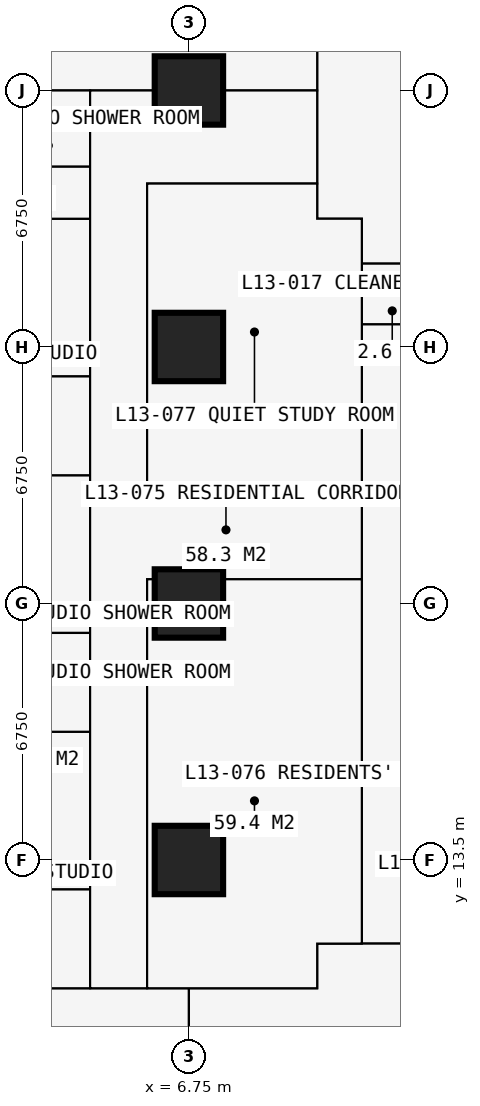
"""IFC4 building model, lengths in metres.
Left out: names, types, materials, properties, quantities, classifications, styles, units other than length and angle.
Written with IfcOpenShell. Run it as: python <this file> out.ifc"""

import sys

from ifc_helpers import new_model, si_unit, direction, frame, frame_2d, origin, origin_2d, place, context, subcontext, project, spatial, rectangle, extrude, element, fill, save


model = new_model("IFC4")
c1 = context("Model", 3, precision=1e-05, world=origin(), true_north=direction((0.0, 1.0)))
c2 = subcontext(c1, "Body", "Model", "MODEL_VIEW")
j1 = project(units=[si_unit("LENGTHUNIT", "METRE"), si_unit("PLANEANGLEUNIT", "RADIAN")], contexts=[c1])
p1 = place(None, origin())
s1 = spatial("IfcSite", under=j1, at=p1, CompositionType="ELEMENT")
p2 = place(p1, origin())
s2 = spatial("IfcBuilding", under=s1, at=p2, CompositionType="ELEMENT")
p3 = place(p2, frame((0.0, 0.0, 50.4)))
s3 = spatial("IfcBuildingStorey", under=s2, at=p3, CompositionType="ELEMENT", Elevation=50.4)
for number, where, z_axis, x_axis in (
    (1, (6.75, 13.5, 0.0), (0.0, 0.0, 1.0), (1.0, 0.0, 0.0)),
    (2, (6.75, 20.25, 0.0), (0.0, 0.0, 1.0), (1.0, 0.0, 0.0)),
    (3, (6.75, 27.0, 0.0), (0.0, 0.0, 1.0), (1.0, 0.0, 0.0)),
    (4, (6.75, 33.75, 0.0), (0.0, 0.0, 1.0), (1.0, 0.0, 0.0)),
):
    element("IfcColumn", number, at=place(p3, frame(where, z_axis=z_axis, x_axis=x_axis)), inside=s3, PredefinedType="COLUMN", context=c2, shape_type="SweptSolid", body=[
        extrude(rectangle(XDim=1.8, YDim=1.8, at=origin_2d()), origin(), (0.0, 0.0, 1.0), 3.6),
    ])
p4 = place(p3, frame((-0.734, 10.125, 0.0), z_axis=(0.0, 0.0, 1.0), x_axis=(1.0, 0.0, 0.0)))
e5 = element("IfcWall", 5, at=p4, inside=s3, PredefinedType="PARTITIONING", context=c2, shape_type="SweptSolid", body=[
    extrude(rectangle(XDim=10.859, YDim=0.15, at=frame_2d((5.429, 0.0))), origin(), (0.0, 0.0, 1.0), 3.375),
])
p5 = place(p4, frame((5.134, 0.0, 0.0)))
e6 = element("IfcOpeningElement", 6, at=p5, cuts=e5, PredefinedType="OPENING", context=c2, shape_type="SweptSolid", body=[
    extrude(rectangle(XDim=1.0, YDim=2.2, at=frame_2d((0.5, 1.1))), frame((0.0, 0.085, 0.0), z_axis=(0.0, -1.0, 0.0), x_axis=(1.0, 0.0, 0.0)), (0.0, 0.0, 1.0), 0.17),
])
p6 = place(p3, frame((-0.734, 16.875, 0.0), z_axis=(0.0, 0.0, 1.0), x_axis=(1.0, 0.0, 0.0)))
e7 = element("IfcWall", 7, at=p6, inside=s3, PredefinedType="PARTITIONING", context=c2, shape_type="SweptSolid", body=[
    extrude(rectangle(XDim=4.884, YDim=0.175, at=frame_2d((2.442, 0.0))), origin(), (0.0, 0.0, 1.0), 3.375),
])
p7 = place(p6, frame((3.234, 0.0, 0.0)))
e8 = element("IfcOpeningElement", 8, at=p7, cuts=e7, PredefinedType="OPENING", context=c2, shape_type="SweptSolid", body=[
    extrude(rectangle(XDim=0.9, YDim=2.2, at=frame_2d((0.45, 1.1))), frame((0.0, 0.097, 0.0), z_axis=(0.0, -1.0, 0.0), x_axis=(1.0, 0.0, 0.0)), (0.0, 0.0, 1.0), 0.195),
])
p8 = place(p3, frame((-0.734, 23.625, 0.0), z_axis=(0.0, 0.0, 1.0), x_axis=(1.0, 0.0, 0.0)))
e9 = element("IfcWall", 9, at=p8, inside=s3, PredefinedType="PARTITIONING", context=c2, shape_type="SweptSolid", body=[
    extrude(rectangle(XDim=4.884, YDim=0.175, at=frame_2d((2.442, 0.0))), origin(), (0.0, 0.0, 1.0), 3.375),
])
p9 = place(p8, frame((3.234, 0.0, 0.0)))
e10 = element("IfcOpeningElement", 10, at=p9, cuts=e9, PredefinedType="OPENING", context=c2, shape_type="SweptSolid", body=[
    extrude(rectangle(XDim=0.9, YDim=2.2, at=frame_2d((0.45, 1.1))), frame((0.0, 0.097, 0.0), z_axis=(0.0, -1.0, 0.0), x_axis=(1.0, 0.0, 0.0)), (0.0, 0.0, 1.0), 0.195),
])
p10 = place(p3, frame((-0.734, 30.375, 0.0), z_axis=(0.0, 0.0, 1.0), x_axis=(1.0, 0.0, 0.0)))
e11 = element("IfcWall", 11, at=p10, inside=s3, PredefinedType="PARTITIONING", context=c2, shape_type="SweptSolid", body=[
    extrude(rectangle(XDim=4.884, YDim=0.175, at=frame_2d((2.442, 0.0))), origin(), (0.0, 0.0, 1.0), 3.375),
])
p11 = place(p3, frame((-0.734, 33.75, 0.0), z_axis=(0.0, 0.0, 1.0), x_axis=(1.0, 0.0, 0.0)))
e12 = element("IfcWall", 12, at=p11, inside=s3, PredefinedType="PARTITIONING", context=c2, shape_type="SweptSolid", body=[
    extrude(rectangle(XDim=10.859, YDim=0.15, at=frame_2d((5.429, 0.0))), origin(), (0.0, 0.0, 1.0), 2.877),
])
for number, where, z_axis, x_axis in (
    (13, (1.75, 12.725, 0.0), (0.0, 0.0, 1.0), (1.0, 0.0, 0.0)),
    (14, (1.75, 19.475, 0.0), (0.0, 0.0, 1.0), (1.0, 0.0, 0.0)),
    (15, (1.75, 26.225, 0.0), (0.0, 0.0, 1.0), (1.0, 0.0, 0.0)),
):
    element("IfcWall", number, at=place(p3, frame(where, z_axis=z_axis, x_axis=x_axis)), inside=s3, PredefinedType="PARTITIONING", context=c2, shape_type="SweptSolid", body=[
        extrude(rectangle(XDim=2.4, YDim=0.1, at=frame_2d((1.2, 0.0))), origin(), (0.0, 0.0, 1.0), 3.375),
    ])
p12 = place(p3, frame((1.95, 31.75, 0.0), z_axis=(0.0, 0.0, 1.0), x_axis=(1.0, 0.0, 0.0)))
e16 = element("IfcWall", 16, at=p12, inside=s3, PredefinedType="PARTITIONING", context=c2, shape_type="SweptSolid", body=[
    extrude(rectangle(XDim=2.2, YDim=0.1, at=frame_2d((1.1, 0.0))), origin(), (0.0, 0.0, 1.0), 3.375),
])
p13 = place(p12, frame((0.65, 0.0, 0.0)))
e17 = element("IfcOpeningElement", 17, at=p13, cuts=e16, PredefinedType="OPENING", context=c2, shape_type="SweptSolid", body=[
    extrude(rectangle(XDim=0.9, YDim=2.2, at=frame_2d((0.45, 1.1))), frame((0.0, 0.06, 0.0), z_axis=(0.0, -1.0, 0.0), x_axis=(1.0, 0.0, 0.0)), (0.0, 0.0, 1.0), 0.12),
])
p14 = place(p3, frame((4.15, 10.125, 0.0), z_axis=(0.0, 0.0, 1.0), x_axis=(0.0, 1.0, 0.0)))
e18 = element("IfcWall", 18, at=p14, inside=s3, PredefinedType="PARTITIONING", context=c2, shape_type="SweptSolid", body=[
    extrude(rectangle(XDim=23.625, YDim=0.15, at=frame_2d((11.812, 0.0))), origin(), (0.0, 0.0, 1.0), 3.375),
])
p15 = place(p14, frame((4.2, 0.0, 0.0)))
e19 = element("IfcOpeningElement", 19, at=p15, cuts=e18, PredefinedType="OPENING", context=c2, shape_type="SweptSolid", body=[
    extrude(rectangle(XDim=0.95, YDim=2.2, at=frame_2d((0.475, 1.1))), frame((0.0, 0.085, 0.0), z_axis=(0.0, -1.0, 0.0), x_axis=(1.0, 0.0, 0.0)), (0.0, 0.0, 1.0), 0.17),
])
p16 = place(p14, frame((10.95, 0.0, 0.0)))
e20 = element("IfcOpeningElement", 20, at=p16, cuts=e18, PredefinedType="OPENING", context=c2, shape_type="SweptSolid", body=[
    extrude(rectangle(XDim=0.95, YDim=2.2, at=frame_2d((0.475, 1.1))), frame((0.0, 0.085, 0.0), z_axis=(0.0, -1.0, 0.0), x_axis=(1.0, 0.0, 0.0)), (0.0, 0.0, 1.0), 0.17),
])
p17 = place(p14, frame((17.7, 0.0, 0.0)))
e21 = element("IfcOpeningElement", 21, at=p17, cuts=e18, PredefinedType="OPENING", context=c2, shape_type="SweptSolid", body=[
    extrude(rectangle(XDim=0.95, YDim=2.2, at=frame_2d((0.475, 1.1))), frame((0.0, 0.085, 0.0), z_axis=(0.0, -1.0, 0.0), x_axis=(1.0, 0.0, 0.0)), (0.0, 0.0, 1.0), 0.17),
])
p18 = place(p14, frame((20.5, 0.0, 0.0)))
e22 = element("IfcOpeningElement", 22, at=p18, cuts=e18, PredefinedType="OPENING", context=c2, shape_type="SweptSolid", body=[
    extrude(rectangle(XDim=0.95, YDim=2.2, at=frame_2d((0.475, 1.1))), frame((0.0, 0.085, 0.0), z_axis=(0.0, -1.0, 0.0), x_axis=(1.0, 0.0, 0.0)), (0.0, 0.0, 1.0), 0.17),
])
p19 = place(p3, frame((5.65, 10.125, 0.0), z_axis=(0.0, 0.0, 1.0), x_axis=(0.0, 1.0, 0.0)))
e23 = element("IfcWall", 23, at=p19, inside=s3, PredefinedType="PARTITIONING", context=c2, shape_type="SweptSolid", body=[
    extrude(rectangle(XDim=10.762, YDim=0.15, at=frame_2d((5.381, 0.0))), origin(), (0.0, 0.0, 1.0), 3.375),
])
p20 = place(p19, frame((4.9, 0.0, 0.0)))
e24 = element("IfcOpeningElement", 24, at=p20, cuts=e23, PredefinedType="OPENING", context=c2, shape_type="SweptSolid", body=[
    extrude(rectangle(XDim=0.95, YDim=2.2, at=frame_2d((0.475, 1.1))), frame((0.0, 0.085, 0.0), z_axis=(0.0, -1.0, 0.0), x_axis=(1.0, 0.0, 0.0)), (0.0, 0.0, 1.0), 0.17),
])
p21 = place(p3, frame((5.65, 20.887, 0.0), z_axis=(0.0, 0.0, 1.0), x_axis=(1.0, 0.0, 0.0)))
e25 = element("IfcWall", 25, at=p21, inside=s3, PredefinedType="PARTITIONING", context=c2, shape_type="SweptSolid", body=[
    extrude(rectangle(XDim=5.65, YDim=0.15, at=frame_2d((2.825, 0.0))), origin(), (0.0, 0.0, 1.0), 3.375),
])
p22 = place(p3, frame((5.65, 22.988, 0.0), z_axis=(0.0, 0.0, 1.0), x_axis=(0.0, 1.0, 0.0)))
e26 = element("IfcWall", 26, at=p22, inside=s3, PredefinedType="PARTITIONING", context=c2, shape_type="SweptSolid", body=[
    extrude(rectangle(XDim=8.312, YDim=0.15, at=frame_2d((4.156, 0.0))), origin(), (0.0, 0.0, 1.0), 3.375),
])
p23 = place(p22, frame((4.95, 0.0, 0.0)))
e27 = element("IfcOpeningElement", 27, at=p23, cuts=e26, PredefinedType="OPENING", context=c2, shape_type="SweptSolid", body=[
    extrude(rectangle(XDim=0.95, YDim=2.2, at=frame_2d((0.475, 1.1))), frame((0.0, 0.085, 0.0), z_axis=(0.0, -1.0, 0.0), x_axis=(1.0, 0.0, 0.0)), (0.0, 0.0, 1.0), 0.17),
])
p24 = place(p3, frame((5.65, 22.988, 0.0), z_axis=(0.0, 0.0, 1.0), x_axis=(1.0, 0.0, 0.0)))
e28 = element("IfcWall", 28, at=p24, inside=s3, PredefinedType="PARTITIONING", context=c2, shape_type="SweptSolid", body=[
    extrude(rectangle(XDim=5.65, YDim=0.15, at=frame_2d((2.825, 0.0))), origin(), (0.0, 0.0, 1.0), 3.375),
])
p25 = place(p3, frame((5.65, 31.3, 0.0), z_axis=(0.0, 0.0, 1.0), x_axis=(1.0, 0.0, 0.0)))
e29 = element("IfcWall", 29, at=p25, inside=s3, PredefinedType="PARTITIONING", context=c2, shape_type="SweptSolid", body=[
    extrude(rectangle(XDim=4.475, YDim=0.15, at=frame_2d((2.238, 0.0))), origin(), (0.0, 0.0, 1.0), 3.375),
])
p26 = place(p3, frame((6.75, -0.734, 0.0), z_axis=(0.0, 0.0, 1.0), x_axis=(0.0, 1.0, 0.0)))
e30 = element("IfcWall", 30, at=p26, inside=s3, PredefinedType="PARTITIONING", context=c2, shape_type="SweptSolid", body=[
    extrude(rectangle(XDim=10.859, YDim=0.15, at=frame_2d((5.429, 0.0))), origin(), (0.0, 0.0, 1.0), 2.877),
])
p27 = place(p3, frame((10.125, 10.125, 0.0), z_axis=(0.0, 0.0, 1.0), x_axis=(0.0, 1.0, 0.0)))
e31 = element("IfcWall", 31, at=p27, inside=s3, PredefinedType="PARTITIONING", context=c2, shape_type="SweptSolid", body=[
    extrude(rectangle(XDim=1.175, YDim=0.15, at=frame_2d((0.587, 0.0))), origin(), (0.0, 0.0, 1.0), 3.375),
])
p28 = place(p3, frame((10.125, 11.3, 0.0), z_axis=(0.0, 0.0, 1.0), x_axis=(1.0, 0.0, 0.0)))
e32 = element("IfcWall", 32, at=p28, inside=s3, PredefinedType="PARTITIONING", context=c2, shape_type="SweptSolid", body=[
    extrude(rectangle(XDim=20.675, YDim=0.15, at=frame_2d((10.337, 0.0))), origin(), (0.0, 0.0, 1.0), 3.375),
])
p29 = place(p28, frame((1.775, 0.0, 0.0)))
e33 = element("IfcOpeningElement", 33, at=p29, cuts=e32, PredefinedType="OPENING", context=c2, shape_type="SweptSolid", body=[
    extrude(rectangle(XDim=1.0, YDim=2.2, at=frame_2d((0.5, 1.1))), frame((0.0, 0.085, 0.0), z_axis=(0.0, -1.0, 0.0), x_axis=(1.0, 0.0, 0.0)), (0.0, 0.0, 1.0), 0.17),
])
p30 = place(p28, frame((11.312, 0.0, 0.0)))
e34 = element("IfcOpeningElement", 34, at=p30, cuts=e32, PredefinedType="OPENING", context=c2, shape_type="SweptSolid", body=[
    extrude(rectangle(XDim=1.0, YDim=2.2, at=frame_2d((0.5, 1.1))), frame((0.0, 0.085, 0.0), z_axis=(0.0, -1.0, 0.0), x_axis=(1.0, 0.0, 0.0)), (0.0, 0.0, 1.0), 0.17),
])
p31 = place(p3, frame((10.125, 30.375, 0.0), z_axis=(0.0, 0.0, 1.0), x_axis=(0.0, 1.0, 0.0)))
e35 = element("IfcWall", 35, at=p31, inside=s3, PredefinedType="PARTITIONING", context=c2, shape_type="SweptSolid", body=[
    extrude(rectangle(XDim=10.859, YDim=0.15, at=frame_2d((5.429, 0.0))), origin(), (0.0, 0.0, 1.0), 3.375),
])
p32 = place(p31, frame((4.725, 0.0, 0.0)))
e36 = element("IfcOpeningElement", 36, at=p32, cuts=e35, PredefinedType="OPENING", context=c2, shape_type="SweptSolid", body=[
    extrude(rectangle(XDim=1.0, YDim=2.2, at=frame_2d((0.5, 1.1))), frame((0.0, 0.085, 0.0), z_axis=(0.0, -1.0, 0.0), x_axis=(1.0, 0.0, 0.0)), (0.0, 0.0, 1.0), 0.17),
])
p33 = place(p3, frame((10.125, 30.375, 0.0), z_axis=(0.0, 0.0, 1.0), x_axis=(1.0, 0.0, 0.0)))
e37 = element("IfcWall", 37, at=p33, inside=s3, PredefinedType="PARTITIONING", context=c2, shape_type="SweptSolid", body=[
    extrude(rectangle(XDim=1.175, YDim=0.15, at=frame_2d((0.587, 0.0))), origin(), (0.0, 0.0, 1.0), 3.375),
])
p34 = place(p3, frame((11.3, 11.3, 0.0), z_axis=(0.0, 0.0, 1.0), x_axis=(0.0, 1.0, 0.0)))
e38 = element("IfcWall", 38, at=p34, inside=s3, PredefinedType="PARTITIONING", context=c2, shape_type="SweptSolid", body=[
    extrude(rectangle(XDim=19.075, YDim=0.15, at=frame_2d((9.538, 0.0))), origin(), (0.0, 0.0, 1.0), 3.375),
])
p35 = place(p34, frame((10.137, 0.0, 0.0)))
e39 = element("IfcOpeningElement", 39, at=p35, cuts=e38, PredefinedType="OPENING", context=c2, shape_type="SweptSolid", body=[
    extrude(rectangle(XDim=1.0, YDim=2.2, at=frame_2d((0.5, 1.1))), frame((0.0, 0.085, 0.0), z_axis=(0.0, -1.0, 0.0), x_axis=(1.0, 0.0, 0.0)), (0.0, 0.0, 1.0), 0.17),
])
p36 = place(p3, frame((11.3, 27.6, 0.0), z_axis=(0.0, 0.0, 1.0), x_axis=(1.0, 0.0, 0.0)))
e40 = element("IfcWall", 40, at=p36, inside=s3, PredefinedType="PARTITIONING", context=c2, shape_type="SweptSolid", body=[
    extrude(rectangle(XDim=1.6, YDim=0.15, at=frame_2d((0.8, 0.0))), origin(), (0.0, 0.0, 1.0), 2.877),
])
p37 = place(p36, frame((0.3, 0.0, 0.0)))
e41 = element("IfcOpeningElement", 41, at=p37, cuts=e40, PredefinedType="OPENING", context=c2, shape_type="SweptSolid", body=[
    extrude(rectangle(XDim=0.95, YDim=2.2, at=frame_2d((0.475, 1.1))), frame((0.0, 0.085, 0.0), z_axis=(0.0, -1.0, 0.0), x_axis=(1.0, 0.0, 0.0)), (0.0, 0.0, 1.0), 0.17),
])
p38 = place(p3, frame((11.3, 29.2, 0.0), z_axis=(0.0, 0.0, 1.0), x_axis=(1.0, 0.0, 0.0)))
e42 = element("IfcWall", 42, at=p38, inside=s3, PredefinedType="PARTITIONING", context=c2, shape_type="SweptSolid", body=[
    extrude(rectangle(XDim=19.075, YDim=0.15, at=frame_2d((9.538, 0.0))), origin(), (0.0, 0.0, 1.0), 3.375),
])
p39 = place(p38, frame((12.875, 0.0, 0.0)))
e43 = element("IfcOpeningElement", 43, at=p39, cuts=e42, PredefinedType="OPENING", context=c2, shape_type="SweptSolid", body=[
    extrude(rectangle(XDim=1.0, YDim=2.2, at=frame_2d((0.5, 1.1))), frame((0.0, 0.085, 0.0), z_axis=(0.0, -1.0, 0.0), x_axis=(1.0, 0.0, 0.0)), (0.0, 0.0, 1.0), 0.17),
])
p40 = place(p38, frame((10.438, 0.0, 0.0)))
e44 = element("IfcOpeningElement", 44, at=p40, cuts=e42, PredefinedType="OPENING", context=c2, shape_type="SweptSolid", body=[
    extrude(rectangle(XDim=1.0, YDim=2.2, at=frame_2d((0.5, 1.1))), frame((0.0, 0.085, 0.0), z_axis=(0.0, -1.0, 0.0), x_axis=(1.0, 0.0, 0.0)), (0.0, 0.0, 1.0), 0.17),
])
p41 = place(p38, frame((15.675, 0.0, 0.0)))
e45 = element("IfcOpeningElement", 45, at=p41, cuts=e42, PredefinedType="OPENING", context=c2, shape_type="SweptSolid", body=[
    extrude(rectangle(XDim=0.95, YDim=2.2, at=frame_2d((0.475, 1.1))), frame((0.0, 0.085, 0.0), z_axis=(0.0, -1.0, 0.0), x_axis=(1.0, 0.0, 0.0)), (0.0, 0.0, 1.0), 0.17),
])
p42 = place(p37, origin())
e46 = element("IfcDoor", 46, at=p42, inside=s3, OperationType="SINGLE_SWING_LEFT", PredefinedType="DOOR", context=c2, shape_type="SweptSolid", body=[
    extrude(rectangle(XDim=0.95, YDim=2.2, at=frame_2d((0.475, 1.1))), frame((0.0, 0.025, 0.0), z_axis=(0.0, -1.0, 0.0), x_axis=(1.0, 0.0, 0.0)), (0.0, 0.0, 1.0), 0.05),
])
fill(e41, e46)
p43 = place(p5, origin())
e47 = element("IfcDoor", 47, at=p43, inside=s3, OperationType="SINGLE_SWING_LEFT", PredefinedType="DOOR", context=c2, shape_type="SweptSolid", body=[
    extrude(rectangle(XDim=1.0, YDim=2.2, at=frame_2d((0.5, 1.1))), frame((0.0, 0.025, 0.0), z_axis=(0.0, -1.0, 0.0), x_axis=(1.0, 0.0, 0.0)), (0.0, 0.0, 1.0), 0.05),
])
fill(e6, e47)
p44 = place(p29, origin())
e48 = element("IfcDoor", 48, at=p44, inside=s3, OperationType="SINGLE_SWING_LEFT", PredefinedType="DOOR", context=c2, shape_type="SweptSolid", body=[
    extrude(rectangle(XDim=1.0, YDim=2.2, at=frame_2d((0.5, 1.1))), frame((0.0, 0.025, 0.0), z_axis=(0.0, -1.0, 0.0), x_axis=(1.0, 0.0, 0.0)), (0.0, 0.0, 1.0), 0.05),
])
fill(e33, e48)
p45 = place(p15, origin())
e49 = element("IfcDoor", 49, at=p45, inside=s3, OperationType="SINGLE_SWING_LEFT", PredefinedType="DOOR", context=c2, shape_type="SweptSolid", body=[
    extrude(rectangle(XDim=0.95, YDim=2.2, at=frame_2d((0.475, 1.1))), frame((0.0, 0.025, 0.0), z_axis=(0.0, -1.0, 0.0), x_axis=(1.0, 0.0, 0.0)), (0.0, 0.0, 1.0), 0.05),
])
fill(e19, e49)
p46 = place(p16, origin())
e50 = element("IfcDoor", 50, at=p46, inside=s3, OperationType="SINGLE_SWING_LEFT", PredefinedType="DOOR", context=c2, shape_type="SweptSolid", body=[
    extrude(rectangle(XDim=0.95, YDim=2.2, at=frame_2d((0.475, 1.1))), frame((0.0, 0.025, 0.0), z_axis=(0.0, -1.0, 0.0), x_axis=(1.0, 0.0, 0.0)), (0.0, 0.0, 1.0), 0.05),
])
fill(e20, e50)
p47 = place(p7, origin())
e51 = element("IfcDoor", 51, at=p47, inside=s3, OperationType="SINGLE_SWING_RIGHT", PredefinedType="DOOR", context=c2, shape_type="SweptSolid", body=[
    extrude(rectangle(XDim=0.9, YDim=2.2, at=frame_2d((0.45, 1.1))), frame((0.0, 0.025, 0.0), z_axis=(0.0, -1.0, 0.0), x_axis=(1.0, 0.0, 0.0)), (0.0, 0.0, 1.0), 0.05),
])
fill(e8, e51)
p48 = place(p17, origin())
e52 = element("IfcDoor", 52, at=p48, inside=s3, OperationType="SINGLE_SWING_LEFT", PredefinedType="DOOR", context=c2, shape_type="SweptSolid", body=[
    extrude(rectangle(XDim=0.95, YDim=2.2, at=frame_2d((0.475, 1.1))), frame((0.0, 0.025, 0.0), z_axis=(0.0, -1.0, 0.0), x_axis=(1.0, 0.0, 0.0)), (0.0, 0.0, 1.0), 0.05),
])
fill(e21, e52)
p49 = place(p9, origin())
e53 = element("IfcDoor", 53, at=p49, inside=s3, OperationType="SINGLE_SWING_RIGHT", PredefinedType="DOOR", context=c2, shape_type="SweptSolid", body=[
    extrude(rectangle(XDim=0.9, YDim=2.2, at=frame_2d((0.45, 1.1))), frame((0.0, 0.025, 0.0), z_axis=(0.0, -1.0, 0.0), x_axis=(1.0, 0.0, 0.0)), (0.0, 0.0, 1.0), 0.05),
])
fill(e10, e53)
p50 = place(p18, origin())
e54 = element("IfcDoor", 54, at=p50, inside=s3, OperationType="SINGLE_SWING_LEFT", PredefinedType="DOOR", context=c2, shape_type="SweptSolid", body=[
    extrude(rectangle(XDim=0.95, YDim=2.2, at=frame_2d((0.475, 1.1))), frame((0.0, 0.025, 0.0), z_axis=(0.0, -1.0, 0.0), x_axis=(1.0, 0.0, 0.0)), (0.0, 0.0, 1.0), 0.05),
])
fill(e22, e54)
p51 = place(p13, origin())
e55 = element("IfcDoor", 55, at=p51, inside=s3, OperationType="SINGLE_SWING_RIGHT", PredefinedType="DOOR", context=c2, shape_type="SweptSolid", body=[
    extrude(rectangle(XDim=0.9, YDim=2.2, at=frame_2d((0.45, 1.1))), frame((0.0, 0.025, 0.0), z_axis=(0.0, -1.0, 0.0), x_axis=(1.0, 0.0, 0.0)), (0.0, 0.0, 1.0), 0.05),
])
fill(e17, e55)
p52 = place(p35, origin())
e56 = element("IfcDoor", 56, at=p52, inside=s3, OperationType="SINGLE_SWING_LEFT", PredefinedType="DOOR", context=c2, shape_type="SweptSolid", body=[
    extrude(rectangle(XDim=1.0, YDim=2.2, at=frame_2d((0.5, 1.1))), frame((0.0, 0.025, 0.0), z_axis=(0.0, -1.0, 0.0), x_axis=(1.0, 0.0, 0.0)), (0.0, 0.0, 1.0), 0.05),
])
fill(e39, e56)
p53 = place(p20, origin())
e57 = element("IfcDoor", 57, at=p53, inside=s3, OperationType="SINGLE_SWING_LEFT", PredefinedType="DOOR", context=c2, shape_type="SweptSolid", body=[
    extrude(rectangle(XDim=0.95, YDim=2.2, at=frame_2d((0.475, 1.1))), frame((0.0, 0.025, 0.0), z_axis=(0.0, -1.0, 0.0), x_axis=(1.0, 0.0, 0.0)), (0.0, 0.0, 1.0), 0.05),
])
fill(e24, e57)
p54 = place(p23, origin())
e58 = element("IfcDoor", 58, at=p54, inside=s3, OperationType="SINGLE_SWING_LEFT", PredefinedType="DOOR", context=c2, shape_type="SweptSolid", body=[
    extrude(rectangle(XDim=0.95, YDim=2.2, at=frame_2d((0.475, 1.1))), frame((0.0, 0.025, 0.0), z_axis=(0.0, -1.0, 0.0), x_axis=(1.0, 0.0, 0.0)), (0.0, 0.0, 1.0), 0.05),
])
fill(e27, e58)
save(model, sys.argv[1])
